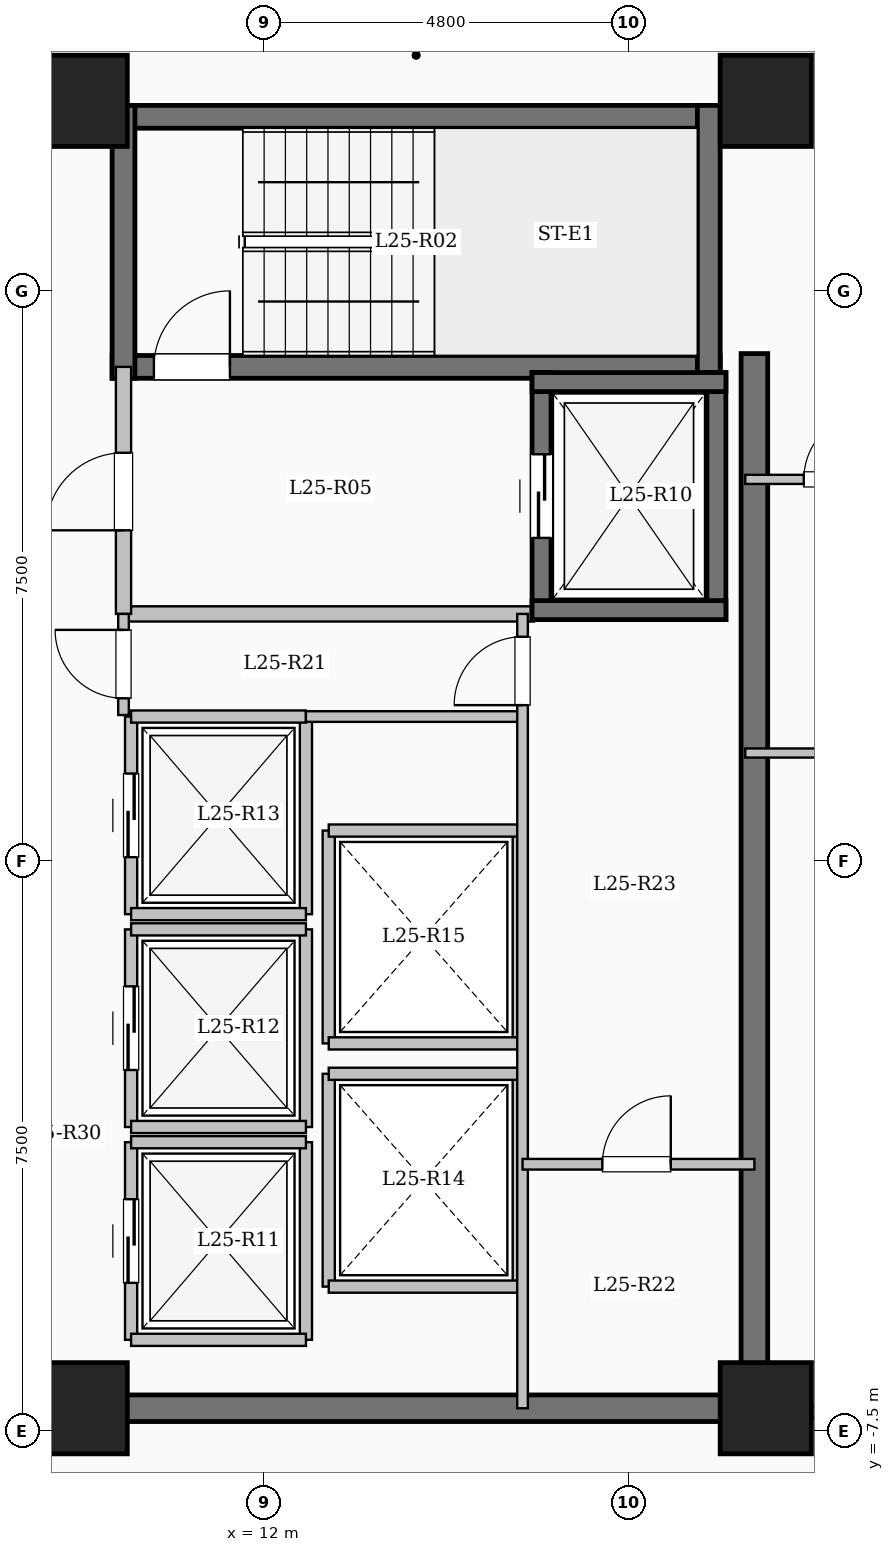
"""IFC4 building model, lengths in metres.
Left out: names, types, materials, properties, quantities, classifications, styles, units other than length and angle.
Written with IfcOpenShell. Run it as: python <this file> out.ifc"""

import sys

from ifc_helpers import new_model, si_unit, direction, frame, frame_2d, origin, origin_2d, place, context, subcontext, project, spatial, rectangle, extrude, element, fill, save


model = new_model("IFC4")
c1 = context("Model", 3, precision=1e-05, world=origin(), true_north=direction((0.0, 1.0)))
c2 = subcontext(c1, "Body", "Model", "MODEL_VIEW")
j1 = project(units=[si_unit("LENGTHUNIT", "METRE"), si_unit("PLANEANGLEUNIT", "RADIAN")], contexts=[c1])
p1 = place(None, origin())
s1 = spatial("IfcSite", under=j1, at=p1, CompositionType="ELEMENT")
p2 = place(p1, origin())
s2 = spatial("IfcBuilding", under=s1, at=p2, CompositionType="ELEMENT")
p3 = place(p2, frame((0.0, 0.0, 95.05)))
s3 = spatial("IfcBuildingStorey", under=s2, at=p3, CompositionType="ELEMENT", Elevation=95.05)
for number, where, z_axis, x_axis in (
    (1, (9.6, -7.2, 0.0), (0.0, 0.0, 1.0), (1.0, 0.0, 0.0)),
    (2, (9.6, 10.0, 0.0), (0.0, 0.0, 1.0), (1.0, 0.0, 0.0)),
    (3, (18.6, -7.2, 0.0), (0.0, 0.0, 1.0), (1.0, 0.0, 0.0)),
    (4, (18.6, 10.0, 0.0), (0.0, 0.0, 1.0), (1.0, 0.0, 0.0)),
):
    element("IfcColumn", number, at=place(p3, frame(where, z_axis=z_axis, x_axis=x_axis)), inside=s3, PredefinedType="COLUMN", context=c2, shape_type="SweptSolid", body=[
        extrude(rectangle(XDim=1.2, YDim=1.2, at=origin_2d()), origin(), (0.0, 0.0, 1.0), 3.35),
    ])
p4 = place(p3, frame((10.0, 9.79, 0.0), z_axis=(0.0, 0.0, 1.0), x_axis=(1.0, 0.0, 0.0)))
e5 = element("IfcWall", 5, at=p4, inside=s3, PredefinedType="SHEAR", context=c2, shape_type="SweptSolid", body=[
    extrude(rectangle(XDim=8.0, YDim=0.3, at=frame_2d((4.0, 0.0))), origin(), (0.0, 0.0, 1.0), 3.35),
])
p5 = place(p3, frame((10.0, 6.5, 0.0), z_axis=(0.0, 0.0, 1.0), x_axis=(1.0, 0.0, 0.0)))
e6 = element("IfcWall", 6, at=p5, inside=s3, PredefinedType="SHEAR", context=c2, shape_type="SweptSolid", body=[
    extrude(rectangle(XDim=8.0, YDim=0.3, at=frame_2d((4.0, 0.0))), origin(), (0.0, 0.0, 1.0), 3.35),
])
p6 = place(p5, frame((0.55, 0.0, 0.0)))
e7 = element("IfcOpeningElement", 7, at=p6, cuts=e6, PredefinedType="OPENING", context=c2, shape_type="SweptSolid", body=[
    extrude(rectangle(XDim=1.0, YDim=2.15, at=frame_2d((0.5, 1.075))), frame((0.0, 0.16, 0.0), z_axis=(0.0, -1.0, 0.0), x_axis=(1.0, 0.0, 0.0)), (0.0, 0.0, 1.0), 0.32),
])
for number, where, z_axis, x_axis in (
    (8, (10.15, 6.35, 0.0), (0.0, 0.0, 1.0), (0.0, 1.0, 0.0)),
    (9, (17.85, 6.35, 0.0), (0.0, 0.0, 1.0), (0.0, 1.0, 0.0)),
):
    element("IfcWall", number, at=place(p3, frame(where, z_axis=z_axis, x_axis=x_axis)), inside=s3, PredefinedType="SHEAR", context=c2, shape_type="SweptSolid", body=[
        extrude(rectangle(XDim=3.59, YDim=0.3, at=frame_2d((1.795, 0.0))), origin(), (0.0, 0.0, 1.0), 3.35),
    ])
p7 = place(p3, frame((10.15, 3.25, 0.0), z_axis=(0.0, 0.0, 1.0), x_axis=(1.0, 0.0, 0.0)))
e10 = element("IfcWall", 10, at=p7, inside=s3, PredefinedType="SOLIDWALL", context=c2, shape_type="SweptSolid", body=[
    extrude(rectangle(XDim=5.4, YDim=0.2, at=frame_2d((2.7, 0.0))), origin(), (0.0, 0.0, 1.0), 3.1),
])
p8 = place(p3, frame((10.15, 3.25, 0.0), z_axis=(0.0, 0.0, 1.0), x_axis=(0.0, 1.0, 0.0)))
e11 = element("IfcWall", 11, at=p8, inside=s3, PredefinedType="SOLIDWALL", context=c2, shape_type="SweptSolid", body=[
    extrude(rectangle(XDim=3.25, YDim=0.2, at=frame_2d((1.625, 0.0))), origin(), (0.0, 0.0, 1.0), 3.1),
])
p9 = place(p8, frame((1.1, 0.0, 0.0)))
e12 = element("IfcOpeningElement", 12, at=p9, cuts=e11, PredefinedType="OPENING", context=c2, shape_type="SweptSolid", body=[
    extrude(rectangle(XDim=1.02, YDim=2.15, at=frame_2d((0.51, 1.075))), frame((0.0, 0.11, 0.0), z_axis=(0.0, -1.0, 0.0), x_axis=(1.0, 0.0, 0.0)), (0.0, 0.0, 1.0), 0.22),
])
p10 = place(p3, frame((15.65, 3.175, 0.0), z_axis=(0.0, 0.0, 1.0), x_axis=(0.0, 1.0, 0.0)))
e13 = element("IfcWall", 13, at=p10, inside=s3, PredefinedType="SHEAR", context=c2, shape_type="SweptSolid", body=[
    extrude(rectangle(XDim=3.25, YDim=0.25, at=frame_2d((1.625, 0.0))), origin(), (0.0, 0.0, 1.0), 3.35),
])
p11 = place(p10, frame((1.075, 0.0, 0.0)))
e14 = element("IfcOpeningElement", 14, at=p11, cuts=e13, PredefinedType="OPENING", context=c2, shape_type="SweptSolid", body=[
    extrude(rectangle(XDim=1.1, YDim=2.15, at=frame_2d((0.55, 1.075))), frame((0.0, 0.135, 0.0), z_axis=(0.0, -1.0, 0.0), x_axis=(1.0, 0.0, 0.0)), (0.0, 0.0, 1.0), 0.27),
])
p12 = place(p3, frame((17.95, 3.175, 0.0), z_axis=(0.0, 0.0, 1.0), x_axis=(0.0, 1.0, 0.0)))
e15 = element("IfcWall", 15, at=p12, inside=s3, PredefinedType="SHEAR", context=c2, shape_type="SweptSolid", body=[
    extrude(rectangle(XDim=3.25, YDim=0.25, at=frame_2d((1.625, 0.0))), origin(), (0.0, 0.0, 1.0), 3.35),
])
for number, where, z_axis, x_axis in (
    (16, (15.525, 3.3, 0.0), (0.0, 0.0, 1.0), (1.0, 0.0, 0.0)),
    (17, (15.525, 6.3, 0.0), (0.0, 0.0, 1.0), (1.0, 0.0, 0.0)),
):
    element("IfcWall", number, at=place(p3, frame(where, z_axis=z_axis, x_axis=x_axis)), inside=s3, PredefinedType="SHEAR", context=c2, shape_type="SweptSolid", body=[
        extrude(rectangle(XDim=2.55, YDim=0.25, at=frame_2d((1.275, 0.0))), origin(), (0.0, 0.0, 1.0), 3.35),
    ])
p13 = place(p3, frame((10.25, -6.3, 0.0), z_axis=(0.0, 0.0, 1.0), x_axis=(0.0, 1.0, 0.0)))
e18 = element("IfcWall", 18, at=p13, inside=s3, PredefinedType="SOLIDWALL", context=c2, shape_type="SweptSolid", body=[
    extrude(rectangle(XDim=2.6, YDim=0.16, at=frame_2d((1.3, 0.0))), origin(), (0.0, 0.0, 1.0), 3.1),
])
p14 = place(p13, frame((0.75, 0.0, 0.0)))
e19 = element("IfcOpeningElement", 19, at=p14, cuts=e18, PredefinedType="OPENING", context=c2, shape_type="SweptSolid", body=[
    extrude(rectangle(XDim=1.1, YDim=2.15, at=frame_2d((0.55, 1.075))), frame((0.0, 0.09, 0.0), z_axis=(0.0, -1.0, 0.0), x_axis=(1.0, 0.0, 0.0)), (0.0, 0.0, 1.0), 0.18),
])
p15 = place(p3, frame((12.55, -6.3, 0.0), z_axis=(0.0, 0.0, 1.0), x_axis=(0.0, 1.0, 0.0)))
e20 = element("IfcWall", 20, at=p15, inside=s3, PredefinedType="SOLIDWALL", context=c2, shape_type="SweptSolid", body=[
    extrude(rectangle(XDim=2.6, YDim=0.16, at=frame_2d((1.3, 0.0))), origin(), (0.0, 0.0, 1.0), 3.1),
])
for number, where, z_axis, x_axis in (
    (21, (10.25, -6.3, 0.0), (0.0, 0.0, 1.0), (1.0, 0.0, 0.0)),
    (22, (10.25, -3.7, 0.0), (0.0, 0.0, 1.0), (1.0, 0.0, 0.0)),
):
    element("IfcWall", number, at=place(p3, frame(where, z_axis=z_axis, x_axis=x_axis)), inside=s3, PredefinedType="SOLIDWALL", context=c2, shape_type="SweptSolid", body=[
        extrude(rectangle(XDim=2.3, YDim=0.16, at=frame_2d((1.15, 0.0))), origin(), (0.0, 0.0, 1.0), 3.1),
    ])
p16 = place(p3, frame((10.25, -3.5, 0.0), z_axis=(0.0, 0.0, 1.0), x_axis=(0.0, 1.0, 0.0)))
e23 = element("IfcWall", 23, at=p16, inside=s3, PredefinedType="SOLIDWALL", context=c2, shape_type="SweptSolid", body=[
    extrude(rectangle(XDim=2.6, YDim=0.16, at=frame_2d((1.3, 0.0))), origin(), (0.0, 0.0, 1.0), 3.1),
])
p17 = place(p16, frame((0.75, 0.0, 0.0)))
e24 = element("IfcOpeningElement", 24, at=p17, cuts=e23, PredefinedType="OPENING", context=c2, shape_type="SweptSolid", body=[
    extrude(rectangle(XDim=1.1, YDim=2.15, at=frame_2d((0.55, 1.075))), frame((0.0, 0.09, 0.0), z_axis=(0.0, -1.0, 0.0), x_axis=(1.0, 0.0, 0.0)), (0.0, 0.0, 1.0), 0.18),
])
p18 = place(p3, frame((12.55, -3.5, 0.0), z_axis=(0.0, 0.0, 1.0), x_axis=(0.0, 1.0, 0.0)))
e25 = element("IfcWall", 25, at=p18, inside=s3, PredefinedType="SOLIDWALL", context=c2, shape_type="SweptSolid", body=[
    extrude(rectangle(XDim=2.6, YDim=0.16, at=frame_2d((1.3, 0.0))), origin(), (0.0, 0.0, 1.0), 3.1),
])
for number, where, z_axis, x_axis in (
    (26, (10.25, -3.5, 0.0), (0.0, 0.0, 1.0), (1.0, 0.0, 0.0)),
    (27, (10.25, -0.9, 0.0), (0.0, 0.0, 1.0), (1.0, 0.0, 0.0)),
):
    element("IfcWall", number, at=place(p3, frame(where, z_axis=z_axis, x_axis=x_axis)), inside=s3, PredefinedType="SOLIDWALL", context=c2, shape_type="SweptSolid", body=[
        extrude(rectangle(XDim=2.3, YDim=0.16, at=frame_2d((1.15, 0.0))), origin(), (0.0, 0.0, 1.0), 3.1),
    ])
p19 = place(p3, frame((10.25, -0.7, 0.0), z_axis=(0.0, 0.0, 1.0), x_axis=(0.0, 1.0, 0.0)))
e28 = element("IfcWall", 28, at=p19, inside=s3, PredefinedType="SOLIDWALL", context=c2, shape_type="SweptSolid", body=[
    extrude(rectangle(XDim=2.6, YDim=0.16, at=frame_2d((1.3, 0.0))), origin(), (0.0, 0.0, 1.0), 3.1),
])
p20 = place(p19, frame((0.75, 0.0, 0.0)))
e29 = element("IfcOpeningElement", 29, at=p20, cuts=e28, PredefinedType="OPENING", context=c2, shape_type="SweptSolid", body=[
    extrude(rectangle(XDim=1.1, YDim=2.15, at=frame_2d((0.55, 1.075))), frame((0.0, 0.09, 0.0), z_axis=(0.0, -1.0, 0.0), x_axis=(1.0, 0.0, 0.0)), (0.0, 0.0, 1.0), 0.18),
])
p21 = place(p3, frame((12.55, -0.7, 0.0), z_axis=(0.0, 0.0, 1.0), x_axis=(0.0, 1.0, 0.0)))
e30 = element("IfcWall", 30, at=p21, inside=s3, PredefinedType="SOLIDWALL", context=c2, shape_type="SweptSolid", body=[
    extrude(rectangle(XDim=2.6, YDim=0.16, at=frame_2d((1.3, 0.0))), origin(), (0.0, 0.0, 1.0), 3.1),
])
for number, where, z_axis, x_axis in (
    (31, (10.25, -0.7, 0.0), (0.0, 0.0, 1.0), (1.0, 0.0, 0.0)),
    (32, (10.25, 1.9, 0.0), (0.0, 0.0, 1.0), (1.0, 0.0, 0.0)),
):
    element("IfcWall", number, at=place(p3, frame(where, z_axis=z_axis, x_axis=x_axis)), inside=s3, PredefinedType="SOLIDWALL", context=c2, shape_type="SweptSolid", body=[
        extrude(rectangle(XDim=2.3, YDim=0.16, at=frame_2d((1.15, 0.0))), origin(), (0.0, 0.0, 1.0), 3.1),
    ])
for number, where, z_axis, x_axis in (
    (33, (12.85, -5.6, 0.0), (0.0, 0.0, 1.0), (0.0, 1.0, 0.0)),
    (34, (15.35, -5.6, 0.0), (0.0, 0.0, 1.0), (0.0, 1.0, 0.0)),
):
    element("IfcWall", number, at=place(p3, frame(where, z_axis=z_axis, x_axis=x_axis)), inside=s3, PredefinedType="SOLIDWALL", context=c2, shape_type="SweptSolid", body=[
        extrude(rectangle(XDim=2.8, YDim=0.16, at=frame_2d((1.4, 0.0))), origin(), (0.0, 0.0, 1.0), 3.1),
    ])
for number, where, z_axis, x_axis in (
    (35, (12.85, -5.6, 0.0), (0.0, 0.0, 1.0), (1.0, 0.0, 0.0)),
    (36, (12.85, -2.8, 0.0), (0.0, 0.0, 1.0), (1.0, 0.0, 0.0)),
):
    element("IfcWall", number, at=place(p3, frame(where, z_axis=z_axis, x_axis=x_axis)), inside=s3, PredefinedType="SOLIDWALL", context=c2, shape_type="SweptSolid", body=[
        extrude(rectangle(XDim=2.5, YDim=0.16, at=frame_2d((1.25, 0.0))), origin(), (0.0, 0.0, 1.0), 3.1),
    ])
for number, where, z_axis, x_axis in (
    (37, (12.85, -2.4, 0.0), (0.0, 0.0, 1.0), (0.0, 1.0, 0.0)),
    (38, (15.35, -2.4, 0.0), (0.0, 0.0, 1.0), (0.0, 1.0, 0.0)),
):
    element("IfcWall", number, at=place(p3, frame(where, z_axis=z_axis, x_axis=x_axis)), inside=s3, PredefinedType="SOLIDWALL", context=c2, shape_type="SweptSolid", body=[
        extrude(rectangle(XDim=2.8, YDim=0.16, at=frame_2d((1.4, 0.0))), origin(), (0.0, 0.0, 1.0), 3.1),
    ])
for number, where, z_axis, x_axis in (
    (39, (12.85, -2.4, 0.0), (0.0, 0.0, 1.0), (1.0, 0.0, 0.0)),
    (40, (12.85, 0.4, 0.0), (0.0, 0.0, 1.0), (1.0, 0.0, 0.0)),
):
    element("IfcWall", number, at=place(p3, frame(where, z_axis=z_axis, x_axis=x_axis)), inside=s3, PredefinedType="SOLIDWALL", context=c2, shape_type="SweptSolid", body=[
        extrude(rectangle(XDim=2.5, YDim=0.16, at=frame_2d((1.25, 0.0))), origin(), (0.0, 0.0, 1.0), 3.1),
    ])
p22 = place(p3, frame((18.45, -7.375, 0.0), z_axis=(0.0, 0.0, 1.0), x_axis=(0.0, 1.0, 0.0)))
e41 = element("IfcWall", 41, at=p22, inside=s3, PredefinedType="SHEAR", context=c2, shape_type="SweptSolid", body=[
    extrude(rectangle(XDim=14.05, YDim=0.35, at=frame_2d((7.025, 0.0))), origin(), (0.0, 0.0, 1.0), 3.35),
])
p23 = place(p3, frame((10.075, -7.2, 0.0), z_axis=(0.0, 0.0, 1.0), x_axis=(1.0, 0.0, 0.0)))
e42 = element("IfcWall", 42, at=p23, inside=s3, PredefinedType="SHEAR", context=c2, shape_type="SweptSolid", body=[
    extrude(rectangle(XDim=8.55, YDim=0.35, at=frame_2d((4.275, 0.0))), origin(), (0.0, 0.0, 1.0), 3.35),
])
p24 = place(p3, frame((12.55, 1.9, 0.0), z_axis=(0.0, 0.0, 1.0), x_axis=(1.0, 0.0, 0.0)))
e43 = element("IfcWall", 43, at=p24, inside=s3, PredefinedType="PARTITIONING", context=c2, shape_type="SweptSolid", body=[
    extrude(rectangle(XDim=2.85, YDim=0.14, at=frame_2d((1.425, 0.0))), origin(), (0.0, 0.0, 1.0), 3.1),
])
p25 = place(p3, frame((10.15, 1.92, 0.0), z_axis=(0.0, 0.0, 1.0), x_axis=(0.0, 1.0, 0.0)))
e44 = element("IfcWall", 44, at=p25, inside=s3, PredefinedType="PARTITIONING", context=c2, shape_type="SweptSolid", body=[
    extrude(rectangle(XDim=1.33, YDim=0.14, at=frame_2d((0.665, 0.0))), origin(), (0.0, 0.0, 1.0), 3.1),
])
p26 = place(p25, frame((0.22, 0.0, 0.0)))
e45 = element("IfcOpeningElement", 45, at=p26, cuts=e44, PredefinedType="OPENING", context=c2, shape_type="SweptSolid", body=[
    extrude(rectangle(XDim=0.9, YDim=2.08, at=frame_2d((0.45, 1.04))), frame((0.0, 0.08, 0.0), z_axis=(0.0, -1.0, 0.0), x_axis=(1.0, 0.0, 0.0)), (0.0, 0.0, 1.0), 0.16),
])
p27 = place(p3, frame((15.4, -7.2, 0.0), z_axis=(0.0, 0.0, 1.0), x_axis=(0.0, 1.0, 0.0)))
e46 = element("IfcWall", 46, at=p27, inside=s3, PredefinedType="PARTITIONING", context=c2, shape_type="SweptSolid", body=[
    extrude(rectangle(XDim=10.45, YDim=0.14, at=frame_2d((5.225, 0.0))), origin(), (0.0, 0.0, 1.0), 3.1),
])
p28 = place(p27, frame((9.25, 0.0, 0.0)))
e47 = element("IfcOpeningElement", 47, at=p28, cuts=e46, PredefinedType="OPENING", context=c2, shape_type="SweptSolid", body=[
    extrude(rectangle(XDim=0.9, YDim=2.08, at=frame_2d((0.45, 1.04))), frame((0.0, 0.08, 0.0), z_axis=(0.0, -1.0, 0.0), x_axis=(1.0, 0.0, 0.0)), (0.0, 0.0, 1.0), 0.16),
])
p29 = place(p3, frame((15.4, -3.99, 0.0), z_axis=(0.0, 0.0, 1.0), x_axis=(1.0, 0.0, 0.0)))
e48 = element("IfcWall", 48, at=p29, inside=s3, PredefinedType="PARTITIONING", context=c2, shape_type="SweptSolid", body=[
    extrude(rectangle(XDim=3.05, YDim=0.14, at=frame_2d((1.525, 0.0))), origin(), (0.0, 0.0, 1.0), 3.1),
])
p30 = place(p29, frame((1.05, 0.0, 0.0)))
e49 = element("IfcOpeningElement", 49, at=p30, cuts=e48, PredefinedType="OPENING", context=c2, shape_type="SweptSolid", body=[
    extrude(rectangle(XDim=0.9, YDim=2.08, at=frame_2d((0.45, 1.04))), frame((0.0, 0.08, 0.0), z_axis=(0.0, -1.0, 0.0), x_axis=(1.0, 0.0, 0.0)), (0.0, 0.0, 1.0), 0.16),
])
p31 = place(p3, frame((18.45, -7.25, 0.0), z_axis=(0.0, 0.0, 1.0), x_axis=(1.0, 0.0, 0.0)))
e50 = element("IfcWall", 50, at=p31, inside=s3, PredefinedType="PARTITIONING", context=c2, shape_type="SweptSolid", body=[
    extrude(rectangle(XDim=8.43, YDim=0.15, at=frame_2d((4.215, 0.0))), origin(), (0.0, 0.0, 1.0), 3.1),
])
p32 = place(p31, frame((1.95, 0.0, 0.0)))
e51 = element("IfcOpeningElement", 51, at=p32, cuts=e50, PredefinedType="OPENING", context=c2, shape_type="SweptSolid", body=[
    extrude(rectangle(XDim=0.96, YDim=2.15, at=frame_2d((0.48, 1.075))), frame((0.0, 0.085, 0.0), z_axis=(0.0, -1.0, 0.0), x_axis=(1.0, 0.0, 0.0)), (0.0, 0.0, 1.0), 0.17),
])
p33 = place(p3, frame((18.33, 1.42, 0.0), z_axis=(0.0, 0.0, 1.0), x_axis=(1.0, 0.0, 0.0)))
e52 = element("IfcWall", 52, at=p33, inside=s3, PredefinedType="PARTITIONING", context=c2, shape_type="SweptSolid", body=[
    extrude(rectangle(XDim=8.67, YDim=0.12, at=frame_2d((4.335, 0.0))), origin(), (0.0, 0.0, 1.0), 3.1),
])
p34 = place(p33, frame((1.863, 0.0, 0.0)))
e53 = element("IfcOpeningElement", 53, at=p34, cuts=e52, PredefinedType="OPENING", context=c2, shape_type="SweptSolid", body=[
    extrude(rectangle(XDim=0.88, YDim=2.1, at=frame_2d((0.44, 1.05))), frame((0.0, 0.07, 0.0), z_axis=(0.0, -1.0, 0.0), x_axis=(1.0, 0.0, 0.0)), (0.0, 0.0, 1.0), 0.14),
])
p35 = place(p33, frame((6.028, 0.0, 0.0)))
e54 = element("IfcOpeningElement", 54, at=p35, cuts=e52, PredefinedType="OPENING", context=c2, shape_type="SweptSolid", body=[
    extrude(rectangle(XDim=0.88, YDim=2.1, at=frame_2d((0.44, 1.05))), frame((0.0, 0.07, 0.0), z_axis=(0.0, -1.0, 0.0), x_axis=(1.0, 0.0, 0.0)), (0.0, 0.0, 1.0), 0.14),
])
p36 = place(p3, frame((18.33, 5.02, 0.0), z_axis=(0.0, 0.0, 1.0), x_axis=(1.0, 0.0, 0.0)))
e55 = element("IfcWall", 55, at=p36, inside=s3, PredefinedType="PARTITIONING", context=c2, shape_type="SweptSolid", body=[
    extrude(rectangle(XDim=8.67, YDim=0.12, at=frame_2d((4.335, 0.0))), origin(), (0.0, 0.0, 1.0), 3.1),
])
p37 = place(p36, frame((0.77, 0.0, 0.0)))
e56 = element("IfcOpeningElement", 56, at=p37, cuts=e55, PredefinedType="OPENING", context=c2, shape_type="SweptSolid", body=[
    extrude(rectangle(XDim=0.88, YDim=2.1, at=frame_2d((0.44, 1.05))), frame((0.0, 0.07, 0.0), z_axis=(0.0, -1.0, 0.0), x_axis=(1.0, 0.0, 0.0)), (0.0, 0.0, 1.0), 0.14),
])
p38 = place(p6, origin())
e57 = element("IfcDoor", 57, at=p38, inside=s3, OperationType="SINGLE_SWING_RIGHT", PredefinedType="DOOR", context=c2, shape_type="SweptSolid", body=[
    extrude(rectangle(XDim=1.0, YDim=2.15, at=frame_2d((0.5, 1.075))), frame((0.0, 0.025, 0.0), z_axis=(0.0, -1.0, 0.0), x_axis=(1.0, 0.0, 0.0)), (0.0, 0.0, 1.0), 0.05),
])
fill(e7, e57)
p39 = place(p9, origin())
e58 = element("IfcDoor", 58, at=p39, inside=s3, OperationType="SINGLE_SWING_LEFT", PredefinedType="DOOR", context=c2, shape_type="SweptSolid", body=[
    extrude(rectangle(XDim=1.02, YDim=2.15, at=frame_2d((0.51, 1.075))), frame((0.0, 0.025, 0.0), z_axis=(0.0, -1.0, 0.0), x_axis=(1.0, 0.0, 0.0)), (0.0, 0.0, 1.0), 0.05),
])
fill(e12, e58)
p40 = place(p11, origin())
e59 = element("IfcDoor", 59, at=p40, inside=s3, OperationType="SLIDING_TO_LEFT", PredefinedType="DOOR", context=c2, shape_type="SweptSolid", body=[
    extrude(rectangle(XDim=1.1, YDim=2.15, at=frame_2d((0.55, 1.075))), frame((0.0, 0.025, 0.0), z_axis=(0.0, -1.0, 0.0), x_axis=(1.0, 0.0, 0.0)), (0.0, 0.0, 1.0), 0.05),
])
fill(e14, e59)
p41 = place(p14, origin())
e60 = element("IfcDoor", 60, at=p41, inside=s3, OperationType="SLIDING_TO_LEFT", PredefinedType="DOOR", context=c2, shape_type="SweptSolid", body=[
    extrude(rectangle(XDim=1.1, YDim=2.15, at=frame_2d((0.55, 1.075))), frame((0.0, 0.025, 0.0), z_axis=(0.0, -1.0, 0.0), x_axis=(1.0, 0.0, 0.0)), (0.0, 0.0, 1.0), 0.05),
])
fill(e19, e60)
p42 = place(p17, origin())
e61 = element("IfcDoor", 61, at=p42, inside=s3, OperationType="SLIDING_TO_LEFT", PredefinedType="DOOR", context=c2, shape_type="SweptSolid", body=[
    extrude(rectangle(XDim=1.1, YDim=2.15, at=frame_2d((0.55, 1.075))), frame((0.0, 0.025, 0.0), z_axis=(0.0, -1.0, 0.0), x_axis=(1.0, 0.0, 0.0)), (0.0, 0.0, 1.0), 0.05),
])
fill(e24, e61)
p43 = place(p20, origin())
e62 = element("IfcDoor", 62, at=p43, inside=s3, OperationType="SLIDING_TO_LEFT", PredefinedType="DOOR", context=c2, shape_type="SweptSolid", body=[
    extrude(rectangle(XDim=1.1, YDim=2.15, at=frame_2d((0.55, 1.075))), frame((0.0, 0.025, 0.0), z_axis=(0.0, -1.0, 0.0), x_axis=(1.0, 0.0, 0.0)), (0.0, 0.0, 1.0), 0.05),
])
fill(e29, e62)
p44 = place(p26, origin())
e63 = element("IfcDoor", 63, at=p44, inside=s3, OperationType="SINGLE_SWING_RIGHT", PredefinedType="DOOR", context=c2, shape_type="SweptSolid", body=[
    extrude(rectangle(XDim=0.9, YDim=2.08, at=frame_2d((0.45, 1.04))), frame((0.0, 0.025, 0.0), z_axis=(0.0, -1.0, 0.0), x_axis=(1.0, 0.0, 0.0)), (0.0, 0.0, 1.0), 0.05),
])
fill(e45, e63)
p45 = place(p28, origin())
e64 = element("IfcDoor", 64, at=p45, inside=s3, OperationType="SINGLE_SWING_LEFT", PredefinedType="DOOR", context=c2, shape_type="SweptSolid", body=[
    extrude(rectangle(XDim=0.9, YDim=2.08, at=frame_2d((0.45, 1.04))), frame((0.0, 0.025, 0.0), z_axis=(0.0, -1.0, 0.0), x_axis=(1.0, 0.0, 0.0)), (0.0, 0.0, 1.0), 0.05),
])
fill(e47, e64)
p46 = place(p30, origin())
e65 = element("IfcDoor", 65, at=p46, inside=s3, OperationType="SINGLE_SWING_RIGHT", PredefinedType="DOOR", context=c2, shape_type="SweptSolid", body=[
    extrude(rectangle(XDim=0.9, YDim=2.08, at=frame_2d((0.45, 1.04))), frame((0.0, 0.025, 0.0), z_axis=(0.0, -1.0, 0.0), x_axis=(1.0, 0.0, 0.0)), (0.0, 0.0, 1.0), 0.05),
])
fill(e49, e65)
p47 = place(p37, origin())
e66 = element("IfcDoor", 66, at=p47, inside=s3, OperationType="SINGLE_SWING_RIGHT", PredefinedType="DOOR", context=c2, shape_type="SweptSolid", body=[
    extrude(rectangle(XDim=0.88, YDim=2.1, at=frame_2d((0.44, 1.05))), frame((0.0, 0.025, 0.0), z_axis=(0.0, -1.0, 0.0), x_axis=(1.0, 0.0, 0.0)), (0.0, 0.0, 1.0), 0.05),
])
fill(e56, e66)
save(model, sys.argv[1])
